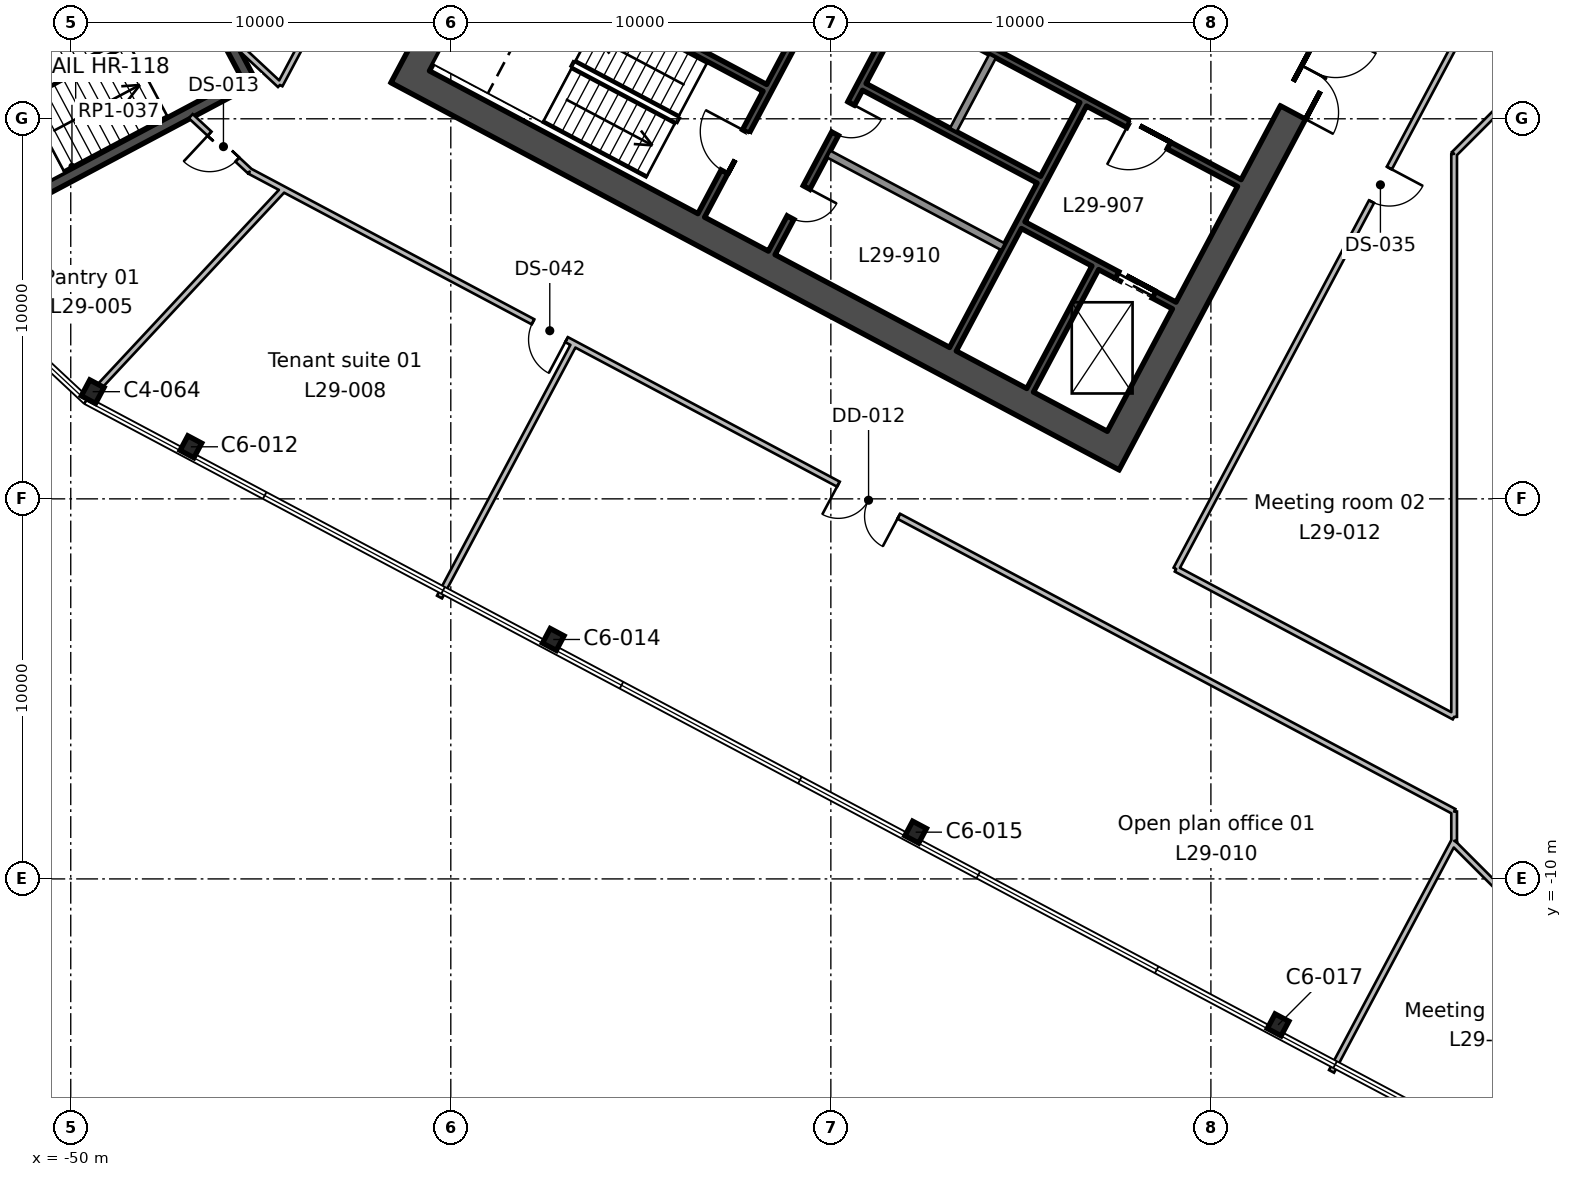
"""IFC4 building model, lengths in metres.
Left out: names, types, materials, properties, quantities, classifications, styles, units other than length and angle.
Written with IfcOpenShell. Run it as: python <this file> out.ifc"""

import sys

from ifc_helpers import new_model, si_unit, direction, frame, frame_2d, origin, origin_2d, place, context, subcontext, project, spatial, rectangle, i_section, extrude, element, fill, save


model = new_model("IFC4")
c1 = context("Model", 3, precision=1e-05, world=origin(), true_north=direction((0.0, 1.0)))
c2 = subcontext(c1, "Body", "Model", "MODEL_VIEW")
j1 = project(units=[si_unit("LENGTHUNIT", "METRE"), si_unit("PLANEANGLEUNIT", "RADIAN")], contexts=[c1])
p1 = place(None, origin())
s1 = spatial("IfcSite", under=j1, at=p1, CompositionType="ELEMENT")
p2 = place(p1, origin())
s2 = spatial("IfcBuilding", under=s1, at=p2, CompositionType="ELEMENT")
p3 = place(p2, frame((0.0, 0.0, 142.2)))
s3 = spatial("IfcBuildingStorey", under=s2, at=p3, CompositionType="ELEMENT", Elevation=142.2)
for number, where, z_axis, x_axis in (
    (1, (-18.232, -13.841, 0.0), (0.0, 0.0, 1.0), (0.883, -0.469, 0.0)),
    (2, (-27.768, -8.77, 0.0), (0.0, 0.0, 1.0), (0.883, -0.469, 0.0)),
    (3, (-37.304, -3.7, 0.0), (0.0, 0.0, 1.0), (0.883, -0.469, 0.0)),
    (4, (-46.839, 1.37, 0.0), (0.0, 0.0, 1.0), (0.883, -0.469, 0.0)),
):
    element("IfcColumn", number, at=place(p3, frame(where, z_axis=z_axis, x_axis=x_axis)), inside=s3, PredefinedType="COLUMN", context=c2, shape_type="SweptSolid", body=[
        extrude(i_section(OverallWidth=0.412, OverallDepth=0.434, WebThickness=0.036, FlangeThickness=0.057, FilletRadius=0.015, at=origin_2d()), origin(), (0.0, 0.0, 1.0), 4.0),
    ])
p4 = place(p3, frame((-49.423, 2.82, 0.0), z_axis=(0.0, 0.0, 1.0), x_axis=(0.882947592859, -0.469471562786, 0.0)))
e5 = element("IfcColumn", 5, at=p4, inside=s3, PredefinedType="COLUMN", context=c2, shape_type="SweptSolid", body=[
    extrude(i_section(OverallWidth=0.424, OverallDepth=0.475, WebThickness=0.048, FlangeThickness=0.077, FilletRadius=0.015, at=origin_2d()), origin(), (0.0, 0.0, 1.0), 4.0),
])
p5 = place(p3, frame((-13.498, 18.333, 0.0), z_axis=(0.0, 0.0, 1.0), x_axis=(-0.469469918705, -0.88294846703, 0.0)))
e6 = element("IfcWall", 6, at=p5, inside=s3, PredefinedType="SHEAR", context=c2, shape_type="SweptSolid", body=[
    extrude(rectangle(XDim=19.7, YDim=0.75, at=frame_2d((9.85, 0.0))), origin(), (0.0, 0.0, 1.0), 4.0),
])
p6 = place(p5, frame((6.85, 0.0, 0.0)))
e7 = element("IfcOpeningElement", 7, at=p6, cuts=e6, PredefinedType="OPENING", context=c2, shape_type="SweptSolid", body=[
    extrude(rectangle(XDim=2.4, YDim=2.4, at=frame_2d((1.2, 1.2))), frame((0.0, 0.385, 0.0), z_axis=(0.0, -1.0, 0.0), x_axis=(1.0, 0.0, 0.0)), (0.0, 0.0, 1.0), 0.77),
])
p7 = place(p3, frame((-31.996, 28.168, 0.0), z_axis=(0.0, 0.0, 1.0), x_axis=(-0.469479580143, -0.882943329908, 0.0)))
e8 = element("IfcWall", 8, at=p7, inside=s3, PredefinedType="SHEAR", context=c2, shape_type="SweptSolid", body=[
    extrude(rectangle(XDim=19.7, YDim=0.75, at=frame_2d((9.85, 0.0))), origin(), (0.0, 0.0, 1.0), 4.0),
])
p8 = place(p7, frame((10.45, 0.0, 0.0)))
e9 = element("IfcOpeningElement", 9, at=p8, cuts=e8, PredefinedType="OPENING", context=c2, shape_type="SweptSolid", body=[
    extrude(rectangle(XDim=2.4, YDim=2.4, at=frame_2d((1.2, 1.2))), frame((0.0, 0.385, 0.0), z_axis=(0.0, -1.0, 0.0), x_axis=(1.0, 0.0, 0.0)), (0.0, 0.0, 1.0), 0.77),
])
p9 = place(p3, frame((-22.902, 1.446, 0.0), z_axis=(0.0, 0.0, 1.0), x_axis=(-0.88294509198, 0.469476266226, 0.0)))
e10 = element("IfcWall", 10, at=p9, inside=s3, PredefinedType="SHEAR", context=c2, shape_type="SweptSolid", body=[
    extrude(rectangle(XDim=20.2, YDim=0.75, at=frame_2d((10.1, 0.0))), origin(), (0.0, 0.0, 1.0), 4.0),
])
p10 = place(p3, frame((-23.043, 6.08, 0.0), z_axis=(0.0, 0.0, 1.0), x_axis=(-0.469494272526, -0.882935517501, 0.0)))
e11 = element("IfcWall", 11, at=p10, inside=s3, PredefinedType="SHEAR", context=c2, shape_type="SweptSolid", body=[
    extrude(rectangle(XDim=3.65, YDim=0.2, at=frame_2d((1.825, 0.0))), origin(), (0.0, 0.0, 1.0), 4.0),
])
p11 = place(p3, frame((-23.36, 10.382, 0.0), z_axis=(0.0, 0.0, 1.0), x_axis=(-0.469480409012, -0.88294288918, 0.0)))
e12 = element("IfcWall", 12, at=p11, inside=s3, PredefinedType="SHEAR", context=c2, shape_type="SweptSolid", body=[
    extrude(rectangle(XDim=7.3, YDim=0.2, at=frame_2d((3.65, 0.0))), origin(), (0.0, 0.0, 1.0), 4.0),
])
p12 = place(p3, frame((-25.744, 11.65, 0.0), z_axis=(0.0, 0.0, 1.0), x_axis=(-0.469487830541, -0.882938942948, 0.0)))
e13 = element("IfcWall", 13, at=p12, inside=s3, PredefinedType="SOLIDWALL", context=c2, shape_type="SweptSolid", body=[
    extrude(rectangle(XDim=2.2, YDim=0.2, at=frame_2d((1.1, 0.0))), origin(), (0.0, 0.0, 1.0), 4.0),
])
p13 = place(p3, frame((-28.128, 12.917, 0.0), z_axis=(0.0, 0.0, 1.0), x_axis=(-0.469454336211, -0.882956752176, 0.0)))
e14 = element("IfcWall", 14, at=p13, inside=s3, PredefinedType="SHEAR", context=c2, shape_type="SweptSolid", body=[
    extrude(rectangle(XDim=7.3, YDim=0.2, at=frame_2d((3.65, 0.0))), origin(), (0.0, 0.0, 1.0), 4.0),
])
p14 = place(p13, frame((2.85, 0.0, 0.0)))
e15 = element("IfcOpeningElement", 15, at=p14, cuts=e14, PredefinedType="OPENING", context=c2, shape_type="SweptSolid", body=[
    extrude(rectangle(XDim=0.9, YDim=2.1, at=frame_2d((0.45, 1.05))), frame((0.0, 0.11, 0.0), z_axis=(0.0, -1.0, 0.0), x_axis=(1.0, 0.0, 0.0)), (0.0, 0.0, 1.0), 0.22),
])
p15 = place(p13, frame((5.35, 0.0, 0.0)))
e16 = element("IfcOpeningElement", 16, at=p15, cuts=e14, PredefinedType="OPENING", context=c2, shape_type="SweptSolid", body=[
    extrude(rectangle(XDim=0.9, YDim=2.1, at=frame_2d((0.45, 1.05))), frame((0.0, 0.11, 0.0), z_axis=(0.0, -1.0, 0.0), x_axis=(1.0, 0.0, 0.0)), (0.0, 0.0, 1.0), 0.22),
])
p16 = place(p3, frame((-29.982, 13.903, 0.0), z_axis=(0.0, 0.0, 1.0), x_axis=(-0.469454336211, -0.882956752176, 0.0)))
e17 = element("IfcWall", 17, at=p16, inside=s3, PredefinedType="SHEAR", context=c2, shape_type="SweptSolid", body=[
    extrude(rectangle(XDim=7.3, YDim=0.2, at=frame_2d((3.65, 0.0))), origin(), (0.0, 0.0, 1.0), 4.0),
])
p17 = place(p16, frame((4.8, 0.0, 0.0)))
e18 = element("IfcOpeningElement", 18, at=p17, cuts=e17, PredefinedType="OPENING", context=c2, shape_type="SweptSolid", body=[
    extrude(rectangle(XDim=1.2, YDim=2.1, at=frame_2d((0.6, 1.05))), frame((0.0, 0.11, 0.0), z_axis=(0.0, -1.0, 0.0), x_axis=(1.0, 0.0, 0.0)), (0.0, 0.0, 1.0), 0.22),
])
p18 = place(p3, frame((-19.252, 8.311, 0.0), z_axis=(0.0, 0.0, 1.0), x_axis=(-0.882955722218, 0.469456273365, 0.0)))
e19 = element("IfcWall", 19, at=p18, inside=s3, PredefinedType="SHEAR", context=c2, shape_type="SweptSolid", body=[
    extrude(rectangle(XDim=10.0, YDim=0.2, at=frame_2d((5.0, 0.0))), origin(), (0.0, 0.0, 1.0), 4.0),
])
p19 = place(p18, frame((2.1, 0.0, 0.0)))
e20 = element("IfcOpeningElement", 20, at=p19, cuts=e19, PredefinedType="OPENING", context=c2, shape_type="SweptSolid", body=[
    extrude(rectangle(XDim=1.2, YDim=2.1, at=frame_2d((0.6, 1.05))), frame((0.0, 0.11, 0.0), z_axis=(0.0, -1.0, 0.0), x_axis=(1.0, 0.0, 0.0)), (0.0, 0.0, 1.0), 0.22),
])
p20 = place(p3, frame((-24.528, 8.398, 0.0), z_axis=(0.0, 0.0, 1.0), x_axis=(-0.882953967957, 0.469459572775, 0.0)))
e21 = element("IfcWall", 21, at=p20, inside=s3, PredefinedType="SHEAR", context=c2, shape_type="SweptSolid", body=[
    extrude(rectangle(XDim=5.2, YDim=0.2, at=frame_2d((2.6, 0.0))), origin(), (0.0, 0.0, 1.0), 4.0),
])
p21 = place(p3, frame((-20.965, 5.088, 0.0), z_axis=(0.0, 0.0, 1.0), x_axis=(-0.882925986334, 0.469512196493, 0.0)))
e22 = element("IfcWall", 22, at=p21, inside=s3, PredefinedType="SHEAR", context=c2, shape_type="SweptSolid", body=[
    extrude(rectangle(XDim=4.5, YDim=0.2, at=frame_2d((2.25, 0.0))), origin(), (0.0, 0.0, 1.0), 4.0),
])
p22 = place(p21, frame((0.6, 0.0, 0.0)))
e23 = element("IfcOpeningElement", 23, at=p22, cuts=e22, PredefinedType="OPENING", context=c2, shape_type="SweptSolid", body=[
    extrude(rectangle(XDim=1.1, YDim=2.1, at=frame_2d((0.55, 1.05))), frame((0.0, 0.11, 0.0), z_axis=(0.0, -1.0, 0.0), x_axis=(1.0, 0.0, 0.0)), (0.0, 0.0, 1.0), 0.22),
])
p23 = place(p3, frame((-31.737, 10.816, 0.0), z_axis=(0.0, 0.0, 1.0), x_axis=(-0.882940221191, 0.469485426614, 0.0)))
e24 = element("IfcWall", 24, at=p23, inside=s3, PredefinedType="SHEAR", context=c2, shape_type="SweptSolid", body=[
    extrude(rectangle(XDim=8.0, YDim=0.2, at=frame_2d((4.0, 0.0))), origin(), (0.0, 0.0, 1.0), 4.0),
])
p24 = place(p3, frame((-25.467, 6.633, 0.0), z_axis=(0.0, 0.0, 1.0), x_axis=(-0.882953967957, 0.469459572775, 0.0)))
e25 = element("IfcWall", 25, at=p24, inside=s3, PredefinedType="SOLIDWALL", context=c2, shape_type="SweptSolid", body=[
    extrude(rectangle(XDim=5.2, YDim=0.2, at=frame_2d((2.6, 0.0))), origin(), (0.0, 0.0, 1.0), 4.0),
])
p25 = place(p3, frame((-47.574, 15.29, 0.0), z_axis=(0.0, 0.0, 1.0), x_axis=(0.469443498566, -0.882962514297, 0.0)))
e26 = element("IfcWall", 26, at=p25, inside=s3, PredefinedType="SHEAR", context=c2, shape_type="SweptSolid", body=[
    extrude(rectangle(XDim=4.85, YDim=0.3, at=frame_2d((2.425, 0.0))), origin(), (0.0, 0.0, 1.0), 4.0),
])
p26 = place(p3, frame((-45.297, 11.007, 0.0), z_axis=(0.0, 0.0, 1.0), x_axis=(-0.882951519127, -0.469464178475, 0.0)))
e27 = element("IfcWall", 27, at=p26, inside=s3, PredefinedType="SHEAR", context=c2, shape_type="SweptSolid", body=[
    extrude(rectangle(XDim=8.3, YDim=0.3, at=frame_2d((4.15, 0.0))), origin(), (0.0, 0.0, 1.0), 4.0),
])
p27 = place(p3, frame((-54.903, 11.393, 0.0), z_axis=(0.0, 0.0, 1.0), x_axis=(0.882939326045, 0.469487110071, 0.0)))
e28 = element("IfcWall", 28, at=p27, inside=s3, PredefinedType="SHEAR", context=c2, shape_type="SweptSolid", body=[
    extrude(rectangle(XDim=8.3, YDim=0.3, at=frame_2d((4.15, 0.0))), origin(), (0.0, 0.0, 1.0), 4.0),
])
p28 = place(p27, frame((6.05, 0.0, 0.0)))
e29 = element("IfcOpeningElement", 29, at=p28, cuts=e28, PredefinedType="OPENING", context=c2, shape_type="SweptSolid", body=[
    extrude(rectangle(XDim=1.9, YDim=2.1, at=frame_2d((0.95, 1.05))), frame((0.0, 0.16, 0.0), z_axis=(0.0, -1.0, 0.0), x_axis=(1.0, 0.0, 0.0)), (0.0, 0.0, 1.0), 0.32),
])
p29 = place(p3, frame((-44.402, 8.149, 0.0), z_axis=(0.0, 0.0, 1.0), x_axis=(-0.682039957921, -0.731314908777, 0.0)))
e30 = element("IfcWall", 30, at=p29, inside=s3, PredefinedType="PARTITIONING", context=c2, shape_type="SweptSolid", body=[
    extrude(rectangle(XDim=7.065, YDim=0.15, at=frame_2d((3.533, 0.0))), origin(), (0.0, 0.0, 1.0), 3.64),
])
p30 = place(p3, frame((-36.752, 4.082, 0.0), z_axis=(0.0, 0.0, 1.0), x_axis=(-0.46955237308, -0.88290462052, 0.0)))
e31 = element("IfcWall", 31, at=p30, inside=s3, PredefinedType="PARTITIONING", context=c2, shape_type="SweptSolid", body=[
    extrude(rectangle(XDim=7.55, YDim=0.15, at=frame_2d((3.775, 0.0))), origin(), (0.0, 0.0, 1.0), 3.64),
])
p31 = place(p3, frame((-33.91, 30.799, 0.0), z_axis=(0.0, 0.0, 1.0), x_axis=(-0.469481348016, -0.88294238989, 0.0)))
e32 = element("IfcWall", 32, at=p31, inside=s3, PredefinedType="PARTITIONING", context=c2, shape_type="SweptSolid", body=[
    extrude(rectangle(XDim=22.549, YDim=0.15, at=frame_2d((11.274, 0.0))), origin(), (0.0, 0.0, 1.0), 3.64),
])
p32 = place(p3, frame((-44.496, 10.89, 0.0), z_axis=(0.0, 0.0, 1.0), x_axis=(-0.731080698145, 0.682291003018, 0.0)))
e33 = element("IfcWall", 33, at=p32, inside=s3, PredefinedType="PARTITIONING", context=c2, shape_type="SweptSolid", body=[
    extrude(rectangle(XDim=1.596, YDim=0.15, at=frame_2d((0.798, 0.0))), origin(), (0.0, 0.0, 1.0), 3.64),
])
p33 = place(p3, frame((-44.462, 8.181, 0.0), z_axis=(0.0, 0.0, 1.0), x_axis=(-0.882750253305, 0.469842516478, 0.0)))
e34 = element("IfcWall", 34, at=p33, inside=s3, PredefinedType="PARTITIONING", context=c2, shape_type="SweptSolid", body=[
    extrude(rectangle(XDim=0.935, YDim=0.15, at=frame_2d((0.467, 0.0))), origin(), (0.0, 0.0, 1.0), 3.64),
])
p34 = place(p3, frame((-45.287, 8.62, 0.0), z_axis=(0.0, 0.0, 1.0), x_axis=(-0.731593637228, 0.681740969846, 0.0)))
e35 = element("IfcWall", 35, at=p34, inside=s3, PredefinedType="PARTITIONING", context=c2, shape_type="SweptSolid", body=[
    extrude(rectangle(XDim=2.125, YDim=0.15, at=frame_2d((1.063, 0.0))), origin(), (0.0, 0.0, 1.0), 3.64),
])
p35 = place(p34, frame((0.45, 0.0, 0.0)))
e36 = element("IfcOpeningElement", 36, at=p35, cuts=e35, PredefinedType="OPENING", context=c2, shape_type="SweptSolid", body=[
    extrude(rectangle(XDim=1.0, YDim=2.1, at=frame_2d((0.5, 1.05))), frame((0.0, 0.085, 0.0), z_axis=(0.0, -1.0, 0.0), x_axis=(1.0, 0.0, 0.0)), (0.0, 0.0, 1.0), 0.17),
])
p36 = place(p3, frame((-13.6, -8.228, 0.0), z_axis=(0.0, 0.0, 1.0), x_axis=(-0.882954510497, 0.469458552369, 0.0)))
e37 = element("IfcWall", 37, at=p36, inside=s3, PredefinedType="PARTITIONING", context=c2, shape_type="SweptSolid", body=[
    extrude(rectangle(XDim=34.953, YDim=0.15, at=frame_2d((17.477, 0.0))), origin(), (0.0, 0.0, 1.0), 3.64),
])
p37 = place(p36, frame((26.45, 0.0, 0.0)))
e38 = element("IfcOpeningElement", 38, at=p37, cuts=e37, PredefinedType="OPENING", context=c2, shape_type="SweptSolid", body=[
    extrude(rectangle(XDim=1.0, YDim=2.1, at=frame_2d((0.5, 1.05))), frame((0.0, 0.085, 0.0), z_axis=(0.0, -1.0, 0.0), x_axis=(1.0, 0.0, 0.0)), (0.0, 0.0, 1.0), 0.17),
])
p38 = place(p36, frame((16.55, 0.0, 0.0)))
e39 = element("IfcOpeningElement", 39, at=p38, cuts=e37, PredefinedType="OPENING", context=c2, shape_type="SweptSolid", body=[
    extrude(rectangle(XDim=1.8, YDim=2.1, at=frame_2d((0.9, 1.05))), frame((0.0, 0.085, 0.0), z_axis=(0.0, -1.0, 0.0), x_axis=(1.0, 0.0, 0.0)), (0.0, 0.0, 1.0), 0.17),
])
p39 = place(p3, frame((-13.6, -8.228, 0.0), z_axis=(0.0, 0.0, 1.0), x_axis=(0.0, -1.0, 0.0)))
e40 = element("IfcWall", 40, at=p39, inside=s3, PredefinedType="PARTITIONING", context=c2, shape_type="SweptSolid", body=[
    extrude(rectangle(XDim=0.77, YDim=0.15, at=frame_2d((0.385, 0.0))), origin(), (0.0, 0.0, 1.0), 3.64),
])
p40 = place(p3, frame((-13.6, -8.998, 0.0), z_axis=(0.0, 0.0, 1.0), x_axis=(-0.469531053644, -0.882915958438, 0.0)))
e41 = element("IfcWall", 41, at=p40, inside=s3, PredefinedType="PARTITIONING", context=c2, shape_type="SweptSolid", body=[
    extrude(rectangle(XDim=6.87, YDim=0.15, at=frame_2d((3.435, 0.0))), origin(), (0.0, 0.0, 1.0), 3.64),
])
p41 = place(p3, frame((-9.077, -13.6, 0.0), z_axis=(0.0, 0.0, 1.0), x_axis=(-0.707106781187, 0.707106781187, 0.0)))
e42 = element("IfcWall", 42, at=p41, inside=s3, PredefinedType="PARTITIONING", context=c2, shape_type="SweptSolid", body=[
    extrude(rectangle(XDim=6.397, YDim=0.15, at=frame_2d((3.198, 0.0))), origin(), (0.0, 0.0, 1.0), 3.64),
])
p42 = place(p3, frame((-20.915, -1.847, 0.0), z_axis=(0.0, 0.0, 1.0), x_axis=(0.469483365134, 0.882941317338, 0.0)))
e43 = element("IfcWall", 43, at=p42, inside=s3, PredefinedType="PARTITIONING", context=c2, shape_type="SweptSolid", body=[
    extrude(rectangle(XDim=22.9, YDim=0.15, at=frame_2d((11.45, 0.0))), origin(), (0.0, 0.0, 1.0), 3.64),
])
p43 = place(p42, frame((10.95, 0.0, 0.0)))
e44 = element("IfcOpeningElement", 44, at=p43, cuts=e43, PredefinedType="OPENING", context=c2, shape_type="SweptSolid", body=[
    extrude(rectangle(XDim=1.0, YDim=2.1, at=frame_2d((0.5, 1.05))), frame((0.0, 0.085, 0.0), z_axis=(0.0, -1.0, 0.0), x_axis=(1.0, 0.0, 0.0)), (0.0, 0.0, 1.0), 0.17),
])
p44 = place(p3, frame((-9.077, 13.6, 0.0), z_axis=(0.0, 0.0, 1.0), x_axis=(-0.707106781187, -0.707106781187, 0.0)))
e45 = element("IfcWall", 45, at=p44, inside=s3, PredefinedType="PARTITIONING", context=c2, shape_type="SweptSolid", body=[
    extrude(rectangle(XDim=6.397, YDim=0.15, at=frame_2d((3.198, 0.0))), origin(), (0.0, 0.0, 1.0), 3.64),
])
p45 = place(p3, frame((-13.6, 9.077, 0.0), z_axis=(0.0, 0.0, 1.0), x_axis=(0.0, -1.0, 0.0)))
e46 = element("IfcWall", 46, at=p45, inside=s3, PredefinedType="PARTITIONING", context=c2, shape_type="SweptSolid", body=[
    extrude(rectangle(XDim=14.814, YDim=0.15, at=frame_2d((7.407, 0.0))), origin(), (0.0, 0.0, 1.0), 3.64),
])
p46 = place(p3, frame((-13.6, -5.737, 0.0), z_axis=(0.0, 0.0, 1.0), x_axis=(-0.882911898193, 0.469538688533, 0.0)))
e47 = element("IfcWall", 47, at=p46, inside=s3, PredefinedType="PARTITIONING", context=c2, shape_type="SweptSolid", body=[
    extrude(rectangle(XDim=8.285, YDim=0.15, at=frame_2d((4.143, 0.0))), origin(), (0.0, 0.0, 1.0), 3.64),
])
p47 = place(p6, origin())
e48 = element("IfcDoor", 48, at=p47, inside=s3, OperationType="DOUBLE_DOOR_SINGLE_SWING", PredefinedType="DOOR", context=c2, shape_type="SweptSolid", body=[
    extrude(rectangle(XDim=2.4, YDim=2.4, at=frame_2d((1.2, 1.2))), frame((0.0, 0.025, 0.0), z_axis=(0.0, -1.0, 0.0), x_axis=(1.0, 0.0, 0.0)), (0.0, 0.0, 1.0), 0.05),
])
fill(e7, e48)
p48 = place(p19, origin())
e49 = element("IfcDoor", 49, at=p48, inside=s3, OperationType="SINGLE_SWING_RIGHT", PredefinedType="DOOR", context=c2, shape_type="SweptSolid", body=[
    extrude(rectangle(XDim=1.2, YDim=2.1, at=frame_2d((0.6, 1.05))), frame((0.0, 0.025, 0.0), z_axis=(0.0, -1.0, 0.0), x_axis=(1.0, 0.0, 0.0)), (0.0, 0.0, 1.0), 0.05),
])
fill(e20, e49)
p49 = place(p17, frame((1.2, 0.0, 0.0), z_axis=(0.0, 0.0, 1.0), x_axis=(-1.0, 0.0, 0.0)))
e50 = element("IfcDoor", 50, at=p49, inside=s3, OperationType="SINGLE_SWING_RIGHT", PredefinedType="DOOR", context=c2, shape_type="SweptSolid", body=[
    extrude(rectangle(XDim=1.2, YDim=2.1, at=frame_2d((0.6, 1.05))), frame((0.0, 0.025, 0.0), z_axis=(0.0, -1.0, 0.0), x_axis=(1.0, 0.0, 0.0)), (0.0, 0.0, 1.0), 0.05),
])
fill(e18, e50)
p50 = place(p22, origin())
e51 = element("IfcDoor", 51, at=p50, inside=s3, OperationType="DOUBLE_DOOR_SLIDING", PredefinedType="DOOR", context=c2, shape_type="SweptSolid", body=[
    extrude(rectangle(XDim=1.1, YDim=2.1, at=frame_2d((0.55, 1.05))), frame((0.0, 0.025, 0.0), z_axis=(0.0, -1.0, 0.0), x_axis=(1.0, 0.0, 0.0)), (0.0, 0.0, 1.0), 0.05),
])
fill(e23, e51)
p51 = place(p14, origin())
e52 = element("IfcDoor", 52, at=p51, inside=s3, OperationType="SINGLE_SWING_LEFT", PredefinedType="DOOR", context=c2, shape_type="SweptSolid", body=[
    extrude(rectangle(XDim=0.9, YDim=2.1, at=frame_2d((0.45, 1.05))), frame((0.0, 0.025, 0.0), z_axis=(0.0, -1.0, 0.0), x_axis=(1.0, 0.0, 0.0)), (0.0, 0.0, 1.0), 0.05),
])
fill(e15, e52)
p52 = place(p15, origin())
e53 = element("IfcDoor", 53, at=p52, inside=s3, OperationType="SINGLE_SWING_LEFT", PredefinedType="DOOR", context=c2, shape_type="SweptSolid", body=[
    extrude(rectangle(XDim=0.9, YDim=2.1, at=frame_2d((0.45, 1.05))), frame((0.0, 0.025, 0.0), z_axis=(0.0, -1.0, 0.0), x_axis=(1.0, 0.0, 0.0)), (0.0, 0.0, 1.0), 0.05),
])
fill(e16, e53)
p53 = place(p43, frame((1.0, 0.0, 0.0), z_axis=(0.0, 0.0, 1.0), x_axis=(-1.0, 0.0, 0.0)))
e54 = element("IfcDoor", 54, at=p53, inside=s3, OperationType="SINGLE_SWING_LEFT", PredefinedType="DOOR", context=c2, shape_type="SweptSolid", body=[
    extrude(rectangle(XDim=1.0, YDim=2.1, at=frame_2d((0.5, 1.05))), frame((0.0, 0.025, 0.0), z_axis=(0.0, -1.0, 0.0), x_axis=(1.0, 0.0, 0.0)), (0.0, 0.0, 1.0), 0.05),
])
fill(e44, e54)
p54 = place(p35, origin())
e55 = element("IfcDoor", 55, at=p54, inside=s3, OperationType="SINGLE_SWING_RIGHT", PredefinedType="DOOR", context=c2, shape_type="SweptSolid", body=[
    extrude(rectangle(XDim=1.0, YDim=2.1, at=frame_2d((0.5, 1.05))), frame((0.0, 0.025, 0.0), z_axis=(0.0, -1.0, 0.0), x_axis=(1.0, 0.0, 0.0)), (0.0, 0.0, 1.0), 0.05),
])
fill(e36, e55)
p55 = place(p37, origin())
e56 = element("IfcDoor", 56, at=p55, inside=s3, OperationType="SINGLE_SWING_LEFT", PredefinedType="DOOR", context=c2, shape_type="SweptSolid", body=[
    extrude(rectangle(XDim=1.0, YDim=2.1, at=frame_2d((0.5, 1.05))), frame((0.0, 0.025, 0.0), z_axis=(0.0, -1.0, 0.0), x_axis=(1.0, 0.0, 0.0)), (0.0, 0.0, 1.0), 0.05),
])
fill(e38, e56)
p56 = place(p38, origin())
e57 = element("IfcDoor", 57, at=p56, inside=s3, OperationType="DOUBLE_DOOR_SINGLE_SWING", PredefinedType="DOOR", context=c2, shape_type="SweptSolid", body=[
    extrude(rectangle(XDim=1.8, YDim=2.1, at=frame_2d((0.9, 1.05))), frame((0.0, 0.025, 0.0), z_axis=(0.0, -1.0, 0.0), x_axis=(1.0, 0.0, 0.0)), (0.0, 0.0, 1.0), 0.05),
])
fill(e39, e57)
save(model, sys.argv[1])
